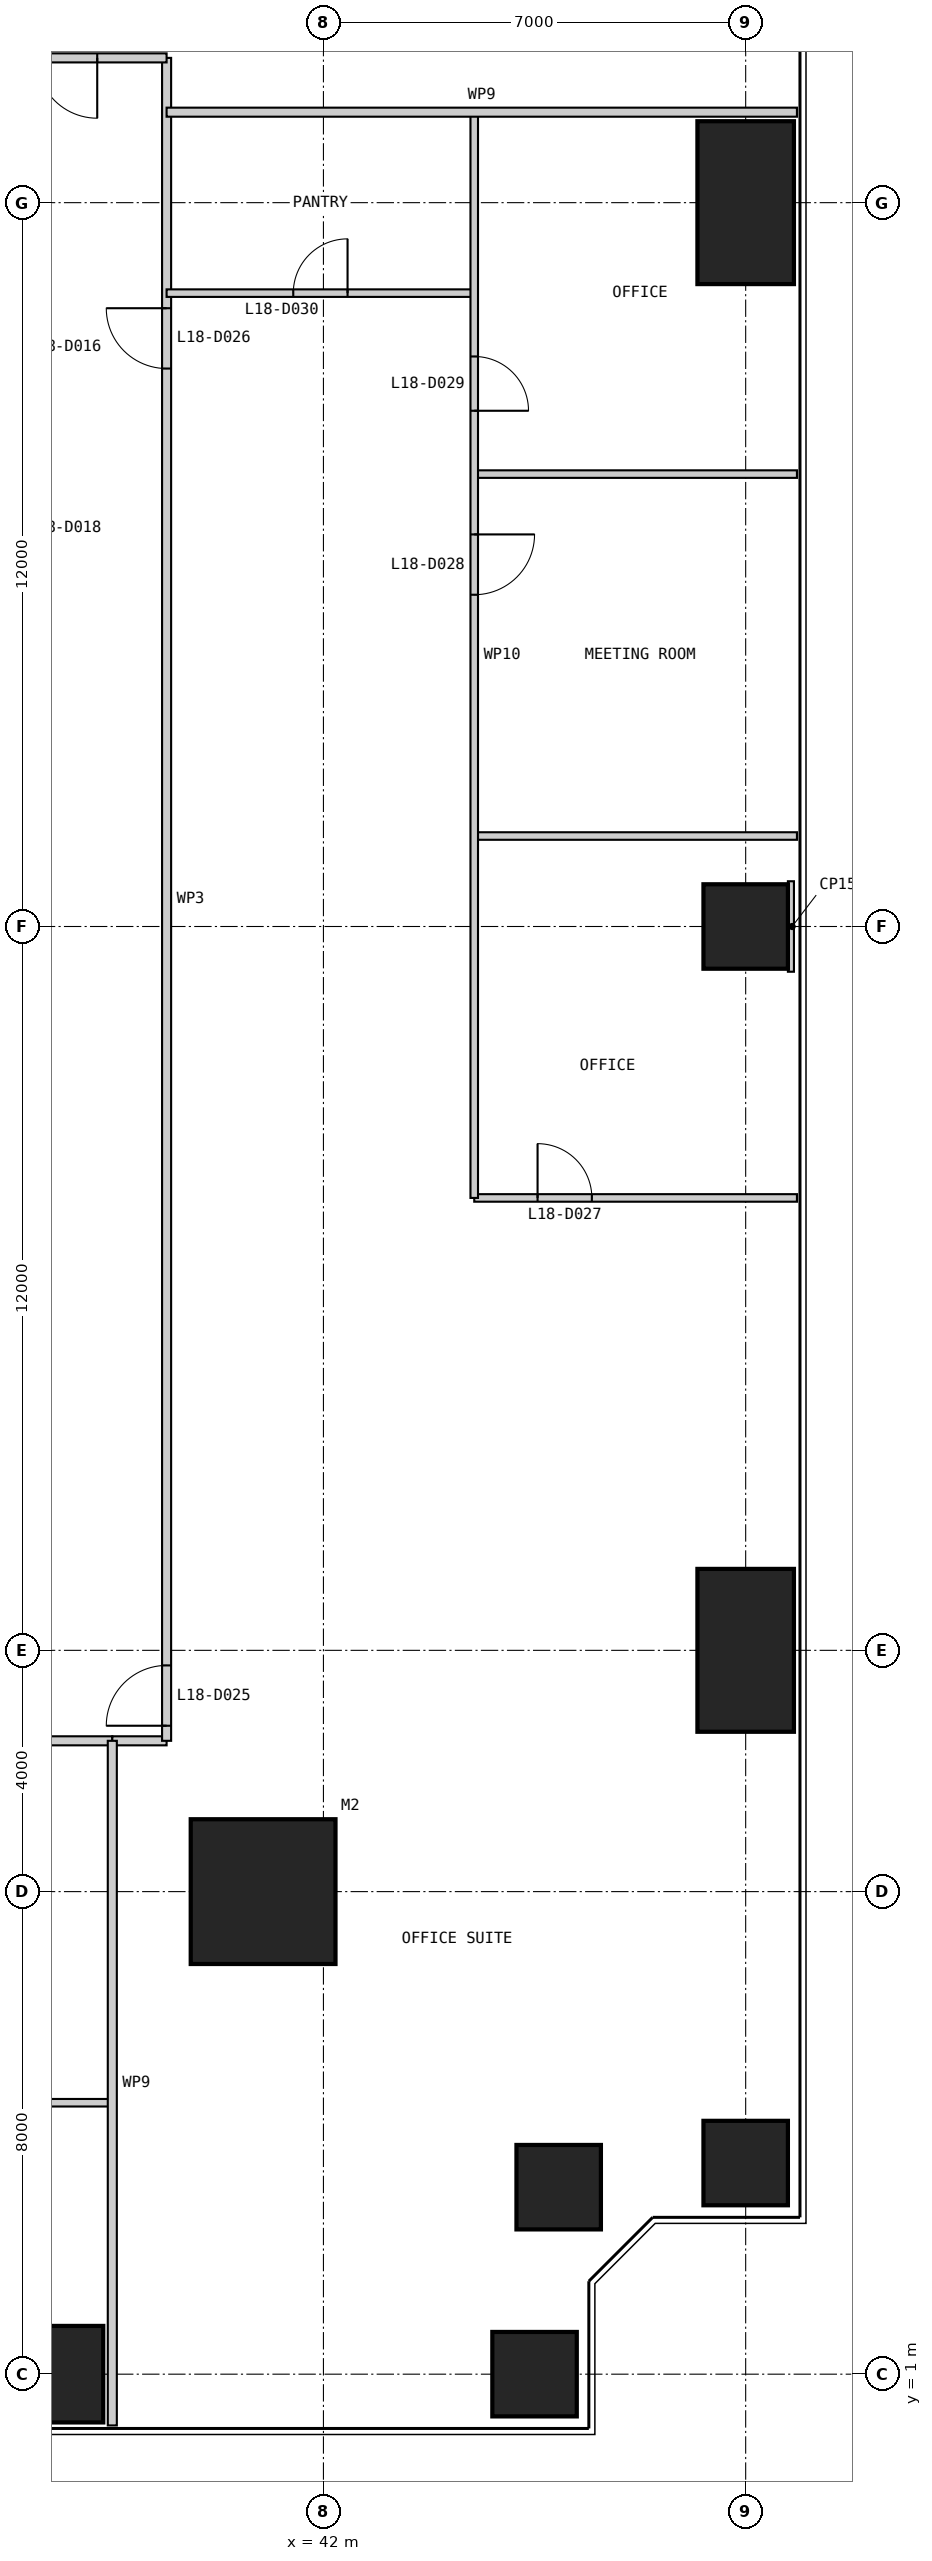
"""IFC4 building model, lengths in metres.
Left out: names, types, materials, properties, quantities, classifications, styles, units other than length and angle.
Written with IfcOpenShell. Run it as: python <this file> out.ifc"""

import sys

from ifc_helpers import new_model, si_unit, direction, frame, frame_2d, origin, origin_2d, place, context, subcontext, project, spatial, rectangle, extrude, element, fill, save


model = new_model("IFC4")
c1 = context("Model", 3, precision=1e-05, world=origin(), true_north=direction((0.0, 1.0)))
c2 = subcontext(c1, "Body", "Model", "MODEL_VIEW")
j1 = project(units=[si_unit("LENGTHUNIT", "METRE"), si_unit("PLANEANGLEUNIT", "RADIAN")], contexts=[c1])
p1 = place(None, origin())
s1 = spatial("IfcSite", under=j1, at=p1, CompositionType="ELEMENT")
p2 = place(p1, origin())
s2 = spatial("IfcBuilding", under=s1, at=p2, CompositionType="ELEMENT")
p3 = place(p2, frame((0.0, 0.0, 79.0)))
s3 = spatial("IfcBuildingStorey", under=s2, at=p3, CompositionType="ELEMENT", Elevation=79.0)
p4 = place(p3, frame((41.0, 9.0, 0.0), z_axis=(0.0, 0.0, 1.0), x_axis=(1.0, 0.0, 0.0)))
e1 = element("IfcColumn", 1, at=p4, inside=s3, PredefinedType="COLUMN", context=c2, shape_type="SweptSolid", body=[
    extrude(rectangle(XDim=2.4, YDim=2.4, at=origin_2d()), origin(), (0.0, 0.0, 1.0), 4.0),
])
p5 = place(p3, frame((37.0, 1.0, 0.0), z_axis=(0.0, 0.0, 1.0), x_axis=(1.0, 0.0, 0.0)))
e2 = element("IfcColumn", 2, at=p5, inside=s3, PredefinedType="COLUMN", context=c2, shape_type="SweptSolid", body=[
    extrude(rectangle(XDim=2.7, YDim=1.6, at=origin_2d()), origin(), (0.0, 0.0, 1.0), 4.0),
])
for number, where, z_axis, x_axis in (
    (3, (45.5, 1.0, 0.0), (0.0, 0.0, 1.0), (1.0, 0.0, 0.0)),
    (4, (45.9, 4.1, 0.0), (0.0, 0.0, 1.0), (1.0, 0.0, 0.0)),
    (5, (49.0, 4.5, 0.0), (0.0, 0.0, 1.0), (1.0, 0.0, 0.0)),
):
    element("IfcColumn", number, at=place(p3, frame(where, z_axis=z_axis, x_axis=x_axis)), inside=s3, PredefinedType="COLUMN", context=c2, shape_type="SweptSolid", body=[
        extrude(rectangle(XDim=1.4, YDim=1.4, at=origin_2d()), origin(), (0.0, 0.0, 1.0), 4.0),
    ])
p6 = place(p3, frame((49.0, 13.0, 0.0), z_axis=(0.0, 0.0, 1.0), x_axis=(1.0, 0.0, 0.0)))
e6 = element("IfcColumn", 6, at=p6, inside=s3, PredefinedType="COLUMN", context=c2, shape_type="SweptSolid", body=[
    extrude(rectangle(XDim=1.6, YDim=2.7, at=origin_2d()), origin(), (0.0, 0.0, 1.0), 4.0),
])
p7 = place(p3, frame((49.0, 25.0, 0.0), z_axis=(0.0, 0.0, 1.0), x_axis=(1.0, 0.0, 0.0)))
e7 = element("IfcColumn", 7, at=p7, inside=s3, PredefinedType="COLUMN", context=c2, shape_type="SweptSolid", body=[
    extrude(rectangle(XDim=1.4, YDim=1.4, at=origin_2d()), origin(), (0.0, 0.0, 1.0), 4.0),
])
p8 = place(p3, frame((49.0, 37.0, 0.0), z_axis=(0.0, 0.0, 1.0), x_axis=(1.0, 0.0, 0.0)))
e8 = element("IfcColumn", 8, at=p8, inside=s3, PredefinedType="COLUMN", context=c2, shape_type="SweptSolid", body=[
    extrude(rectangle(XDim=1.6, YDim=2.7, at=origin_2d()), origin(), (0.0, 0.0, 1.0), 4.0),
])
p9 = place(p3, frame((11.5, 11.5, 0.0), z_axis=(0.0, 0.0, 1.0), x_axis=(1.0, 0.0, 0.0)))
e9 = element("IfcWall", 9, at=p9, inside=s3, PredefinedType="PARTITIONING", context=c2, shape_type="SweptSolid", body=[
    extrude(rectangle(XDim=27.0, YDim=0.15, at=frame_2d((13.5, 0.0))), origin(), (0.0, 0.0, 1.0), 3.85),
])
p10 = place(p9, frame((11.5, 0.0, 0.0)))
e10 = element("IfcOpeningElement", 10, at=p10, cuts=e9, PredefinedType="OPENING", context=c2, shape_type="SweptSolid", body=[
    extrude(rectangle(XDim=1.0, YDim=2.2, at=frame_2d((0.5, 1.1))), frame((0.0, 0.085, 0.0), z_axis=(0.0, -1.0, 0.0), x_axis=(1.0, 0.0, 0.0)), (0.0, 0.0, 1.0), 0.17),
])
p11 = place(p3, frame((14.5, 5.5, 0.0), z_axis=(0.0, 0.0, 1.0), x_axis=(1.0, 0.0, 0.0)))
e11 = element("IfcWall", 11, at=p11, inside=s3, PredefinedType="PARTITIONING", context=c2, shape_type="SweptSolid", body=[
    extrude(rectangle(XDim=24.0, YDim=0.125, at=frame_2d((12.0, 0.0))), origin(), (0.0, 0.0, 1.0), 3.85),
])
p12 = place(p11, frame((10.05, 0.0, 0.0)))
e12 = element("IfcOpeningElement", 12, at=p12, cuts=e11, PredefinedType="OPENING", context=c2, shape_type="SweptSolid", body=[
    extrude(rectangle(XDim=0.9, YDim=2.2, at=frame_2d((0.45, 1.1))), frame((0.0, 0.073, 0.0), z_axis=(0.0, -1.0, 0.0), x_axis=(1.0, 0.0, 0.0)), (0.0, 0.0, 1.0), 0.145),
])
p13 = place(p11, frame((16.05, 0.0, 0.0)))
e13 = element("IfcOpeningElement", 13, at=p13, cuts=e11, PredefinedType="OPENING", context=c2, shape_type="SweptSolid", body=[
    extrude(rectangle(XDim=0.9, YDim=2.2, at=frame_2d((0.45, 1.1))), frame((0.0, 0.073, 0.0), z_axis=(0.0, -1.0, 0.0), x_axis=(1.0, 0.0, 0.0)), (0.0, 0.0, 1.0), 0.145),
])
p14 = place(p11, frame((19.05, 0.0, 0.0)))
e14 = element("IfcOpeningElement", 14, at=p14, cuts=e11, PredefinedType="OPENING", context=c2, shape_type="SweptSolid", body=[
    extrude(rectangle(XDim=0.9, YDim=2.2, at=frame_2d((0.45, 1.1))), frame((0.0, 0.073, 0.0), z_axis=(0.0, -1.0, 0.0), x_axis=(1.0, 0.0, 0.0)), (0.0, 0.0, 1.0), 0.145),
])
p15 = place(p3, frame((38.5, 11.5, 0.0), z_axis=(0.0, 0.0, 1.0), x_axis=(1.0, 0.0, 0.0)))
e15 = element("IfcWall", 15, at=p15, inside=s3, PredefinedType="PARTITIONING", context=c2, shape_type="SweptSolid", body=[
    extrude(rectangle(XDim=0.9, YDim=0.15, at=frame_2d((0.45, 0.0))), origin(), (0.0, 0.0, 1.0), 3.85),
])
p16 = place(p3, frame((39.4, 11.5, 0.0), z_axis=(0.0, 0.0, 1.0), x_axis=(0.0, 1.0, 0.0)))
e16 = element("IfcWall", 16, at=p16, inside=s3, PredefinedType="PARTITIONING", context=c2, shape_type="SweptSolid", body=[
    extrude(rectangle(XDim=27.9, YDim=0.15, at=frame_2d((13.95, 0.0))), origin(), (0.0, 0.0, 1.0), 3.85),
])
p17 = place(p16, frame((0.25, 0.0, 0.0)))
e17 = element("IfcOpeningElement", 17, at=p17, cuts=e16, PredefinedType="OPENING", context=c2, shape_type="SweptSolid", body=[
    extrude(rectangle(XDim=1.0, YDim=2.2, at=frame_2d((0.5, 1.1))), frame((0.0, 0.085, 0.0), z_axis=(0.0, -1.0, 0.0), x_axis=(1.0, 0.0, 0.0)), (0.0, 0.0, 1.0), 0.17),
])
p18 = place(p16, frame((22.75, 0.0, 0.0)))
e18 = element("IfcOpeningElement", 18, at=p18, cuts=e16, PredefinedType="OPENING", context=c2, shape_type="SweptSolid", body=[
    extrude(rectangle(XDim=1.0, YDim=2.2, at=frame_2d((0.5, 1.1))), frame((0.0, 0.085, 0.0), z_axis=(0.0, -1.0, 0.0), x_axis=(1.0, 0.0, 0.0)), (0.0, 0.0, 1.0), 0.17),
])
p19 = place(p3, frame((38.5, 0.15, 0.0), z_axis=(0.0, 0.0, 1.0), x_axis=(0.0, 1.0, 0.0)))
e19 = element("IfcWall", 19, at=p19, inside=s3, PredefinedType="PARTITIONING", context=c2, shape_type="SweptSolid", body=[
    extrude(rectangle(XDim=11.35, YDim=0.15, at=frame_2d((5.675, 0.0))), origin(), (0.0, 0.0, 1.0), 3.85),
])
p20 = place(p3, frame((49.85, 20.5, 0.0), z_axis=(0.0, 0.0, 1.0), x_axis=(-1.0, 0.0, 0.0)))
e20 = element("IfcWall", 20, at=p20, inside=s3, PredefinedType="PARTITIONING", context=c2, shape_type="SweptSolid", body=[
    extrude(rectangle(XDim=5.35, YDim=0.125, at=frame_2d((2.675, 0.0))), origin(), (0.0, 0.0, 1.0), 3.85),
])
p21 = place(p20, frame((3.4, 0.0, 0.0)))
e21 = element("IfcOpeningElement", 21, at=p21, cuts=e20, PredefinedType="OPENING", context=c2, shape_type="SweptSolid", body=[
    extrude(rectangle(XDim=0.9, YDim=2.2, at=frame_2d((0.45, 1.1))), frame((0.0, 0.073, 0.0), z_axis=(0.0, -1.0, 0.0), x_axis=(1.0, 0.0, 0.0)), (0.0, 0.0, 1.0), 0.145),
])
for number, where, z_axis, x_axis in (
    (22, (49.85, 26.5, 0.0), (0.0, 0.0, 1.0), (-1.0, 0.0, 0.0)),
    (23, (49.85, 32.5, 0.0), (0.0, 0.0, 1.0), (-1.0, 0.0, 0.0)),
):
    element("IfcWall", number, at=place(p3, frame(where, z_axis=z_axis, x_axis=x_axis)), inside=s3, PredefinedType="PARTITIONING", context=c2, shape_type="SweptSolid", body=[
        extrude(rectangle(XDim=5.35, YDim=0.125, at=frame_2d((2.675, 0.0))), origin(), (0.0, 0.0, 1.0), 3.85),
    ])
p22 = place(p3, frame((44.5, 35.5, 0.0), z_axis=(0.0, 0.0, 1.0), x_axis=(-1.0, 0.0, 0.0)))
e24 = element("IfcWall", 24, at=p22, inside=s3, PredefinedType="PARTITIONING", context=c2, shape_type="SweptSolid", body=[
    extrude(rectangle(XDim=5.1, YDim=0.125, at=frame_2d((2.55, 0.0))), origin(), (0.0, 0.0, 1.0), 3.85),
])
p23 = place(p22, frame((2.1, 0.0, 0.0)))
e25 = element("IfcOpeningElement", 25, at=p23, cuts=e24, PredefinedType="OPENING", context=c2, shape_type="SweptSolid", body=[
    extrude(rectangle(XDim=0.9, YDim=2.2, at=frame_2d((0.45, 1.1))), frame((0.0, 0.073, 0.0), z_axis=(0.0, -1.0, 0.0), x_axis=(1.0, 0.0, 0.0)), (0.0, 0.0, 1.0), 0.145),
])
p24 = place(p3, frame((44.5, 20.5, 0.0), z_axis=(0.0, 0.0, 1.0), x_axis=(0.0, 1.0, 0.0)))
e26 = element("IfcWall", 26, at=p24, inside=s3, PredefinedType="PARTITIONING", context=c2, shape_type="SweptSolid", body=[
    extrude(rectangle(XDim=18.0, YDim=0.125, at=frame_2d((9.0, 0.0))), origin(), (0.0, 0.0, 1.0), 3.85),
])
p25 = place(p24, frame((10.0, 0.0, 0.0)))
e27 = element("IfcOpeningElement", 27, at=p25, cuts=e26, PredefinedType="OPENING", context=c2, shape_type="SweptSolid", body=[
    extrude(rectangle(XDim=1.0, YDim=2.2, at=frame_2d((0.5, 1.1))), frame((0.0, 0.073, 0.0), z_axis=(0.0, -1.0, 0.0), x_axis=(1.0, 0.0, 0.0)), (0.0, 0.0, 1.0), 0.145),
])
p26 = place(p24, frame((13.05, 0.0, 0.0)))
e28 = element("IfcOpeningElement", 28, at=p26, cuts=e26, PredefinedType="OPENING", context=c2, shape_type="SweptSolid", body=[
    extrude(rectangle(XDim=0.9, YDim=2.2, at=frame_2d((0.45, 1.1))), frame((0.0, 0.073, 0.0), z_axis=(0.0, -1.0, 0.0), x_axis=(1.0, 0.0, 0.0)), (0.0, 0.0, 1.0), 0.145),
])
p27 = place(p3, frame((39.4, 39.4, 0.0), z_axis=(0.0, 0.0, 1.0), x_axis=(-1.0, 0.0, 0.0)))
e29 = element("IfcWall", 29, at=p27, inside=s3, PredefinedType="PARTITIONING", context=c2, shape_type="SweptSolid", body=[
    extrude(rectangle(XDim=28.8, YDim=0.15, at=frame_2d((14.4, 0.0))), origin(), (0.0, 0.0, 1.0), 3.85),
])
p28 = place(p27, frame((1.15, 0.0, 0.0)))
e30 = element("IfcOpeningElement", 30, at=p28, cuts=e29, PredefinedType="OPENING", context=c2, shape_type="SweptSolid", body=[
    extrude(rectangle(XDim=1.0, YDim=2.2, at=frame_2d((0.5, 1.1))), frame((0.0, 0.085, 0.0), z_axis=(0.0, -1.0, 0.0), x_axis=(1.0, 0.0, 0.0)), (0.0, 0.0, 1.0), 0.17),
])
p29 = place(p27, frame((23.65, 0.0, 0.0)))
e31 = element("IfcOpeningElement", 31, at=p29, cuts=e29, PredefinedType="OPENING", context=c2, shape_type="SweptSolid", body=[
    extrude(rectangle(XDim=1.0, YDim=2.2, at=frame_2d((0.5, 1.1))), frame((0.0, 0.085, 0.0), z_axis=(0.0, -1.0, 0.0), x_axis=(1.0, 0.0, 0.0)), (0.0, 0.0, 1.0), 0.17),
])
p30 = place(p3, frame((49.85, 38.5, 0.0), z_axis=(0.0, 0.0, 1.0), x_axis=(-1.0, 0.0, 0.0)))
e32 = element("IfcWall", 32, at=p30, inside=s3, PredefinedType="PARTITIONING", context=c2, shape_type="SweptSolid", body=[
    extrude(rectangle(XDim=10.45, YDim=0.15, at=frame_2d((5.225, 0.0))), origin(), (0.0, 0.0, 1.0), 3.85),
])
p31 = place(p3, frame((49.8, 25.0, 0.0), z_axis=(0.0, 0.0, 1.0), x_axis=(-1.0, 0.0, 0.0)))
e33 = element("IfcWall", 33, at=p31, inside=s3, PredefinedType="PARTITIONING", context=c2, shape_type="SweptSolid", body=[
    extrude(rectangle(XDim=0.1, YDim=1.5, at=frame_2d((0.05, 0.0))), origin(), (0.0, 0.0, 1.0), 3.85),
])
p32 = place(p17, origin())
e34 = element("IfcDoor", 34, at=p32, inside=s3, OperationType="SINGLE_SWING_LEFT", PredefinedType="DOOR", context=c2, shape_type="SweptSolid", body=[
    extrude(rectangle(XDim=1.0, YDim=2.2, at=frame_2d((0.5, 1.1))), frame((0.0, 0.025, 0.0), z_axis=(0.0, -1.0, 0.0), x_axis=(1.0, 0.0, 0.0)), (0.0, 0.0, 1.0), 0.05),
])
fill(e17, e34)
p33 = place(p18, origin())
e35 = element("IfcDoor", 35, at=p33, inside=s3, OperationType="SINGLE_SWING_RIGHT", PredefinedType="DOOR", context=c2, shape_type="SweptSolid", body=[
    extrude(rectangle(XDim=1.0, YDim=2.2, at=frame_2d((0.5, 1.1))), frame((0.0, 0.025, 0.0), z_axis=(0.0, -1.0, 0.0), x_axis=(1.0, 0.0, 0.0)), (0.0, 0.0, 1.0), 0.05),
])
fill(e18, e35)
p34 = place(p21, frame((0.9, 0.0, 0.0), z_axis=(0.0, 0.0, 1.0), x_axis=(-1.0, 0.0, 0.0)))
e36 = element("IfcDoor", 36, at=p34, inside=s3, OperationType="SINGLE_SWING_LEFT", PredefinedType="DOOR", context=c2, shape_type="SweptSolid", body=[
    extrude(rectangle(XDim=0.9, YDim=2.2, at=frame_2d((0.45, 1.1))), frame((0.0, 0.025, 0.0), z_axis=(0.0, -1.0, 0.0), x_axis=(1.0, 0.0, 0.0)), (0.0, 0.0, 1.0), 0.05),
])
fill(e21, e36)
p35 = place(p25, frame((1.0, 0.0, 0.0), z_axis=(0.0, 0.0, 1.0), x_axis=(-1.0, 0.0, 0.0)))
e37 = element("IfcDoor", 37, at=p35, inside=s3, OperationType="SINGLE_SWING_LEFT", PredefinedType="DOOR", context=c2, shape_type="SweptSolid", body=[
    extrude(rectangle(XDim=1.0, YDim=2.2, at=frame_2d((0.5, 1.1))), frame((0.0, 0.025, 0.0), z_axis=(0.0, -1.0, 0.0), x_axis=(1.0, 0.0, 0.0)), (0.0, 0.0, 1.0), 0.05),
])
fill(e27, e37)
p36 = place(p26, frame((0.9, 0.0, 0.0), z_axis=(0.0, 0.0, 1.0), x_axis=(-1.0, 0.0, 0.0)))
e38 = element("IfcDoor", 38, at=p36, inside=s3, OperationType="SINGLE_SWING_RIGHT", PredefinedType="DOOR", context=c2, shape_type="SweptSolid", body=[
    extrude(rectangle(XDim=0.9, YDim=2.2, at=frame_2d((0.45, 1.1))), frame((0.0, 0.025, 0.0), z_axis=(0.0, -1.0, 0.0), x_axis=(1.0, 0.0, 0.0)), (0.0, 0.0, 1.0), 0.05),
])
fill(e28, e38)
p37 = place(p23, frame((0.9, 0.0, 0.0), z_axis=(0.0, 0.0, 1.0), x_axis=(-1.0, 0.0, 0.0)))
e39 = element("IfcDoor", 39, at=p37, inside=s3, OperationType="SINGLE_SWING_RIGHT", PredefinedType="DOOR", context=c2, shape_type="SweptSolid", body=[
    extrude(rectangle(XDim=0.9, YDim=2.2, at=frame_2d((0.45, 1.1))), frame((0.0, 0.025, 0.0), z_axis=(0.0, -1.0, 0.0), x_axis=(1.0, 0.0, 0.0)), (0.0, 0.0, 1.0), 0.05),
])
fill(e25, e39)
p38 = place(p28, origin())
e40 = element("IfcDoor", 40, at=p38, inside=s3, OperationType="SINGLE_SWING_LEFT", PredefinedType="DOOR", context=c2, shape_type="SweptSolid", body=[
    extrude(rectangle(XDim=1.0, YDim=2.2, at=frame_2d((0.5, 1.1))), frame((0.0, 0.025, 0.0), z_axis=(0.0, -1.0, 0.0), x_axis=(1.0, 0.0, 0.0)), (0.0, 0.0, 1.0), 0.05),
])
fill(e30, e40)
save(model, sys.argv[1])
